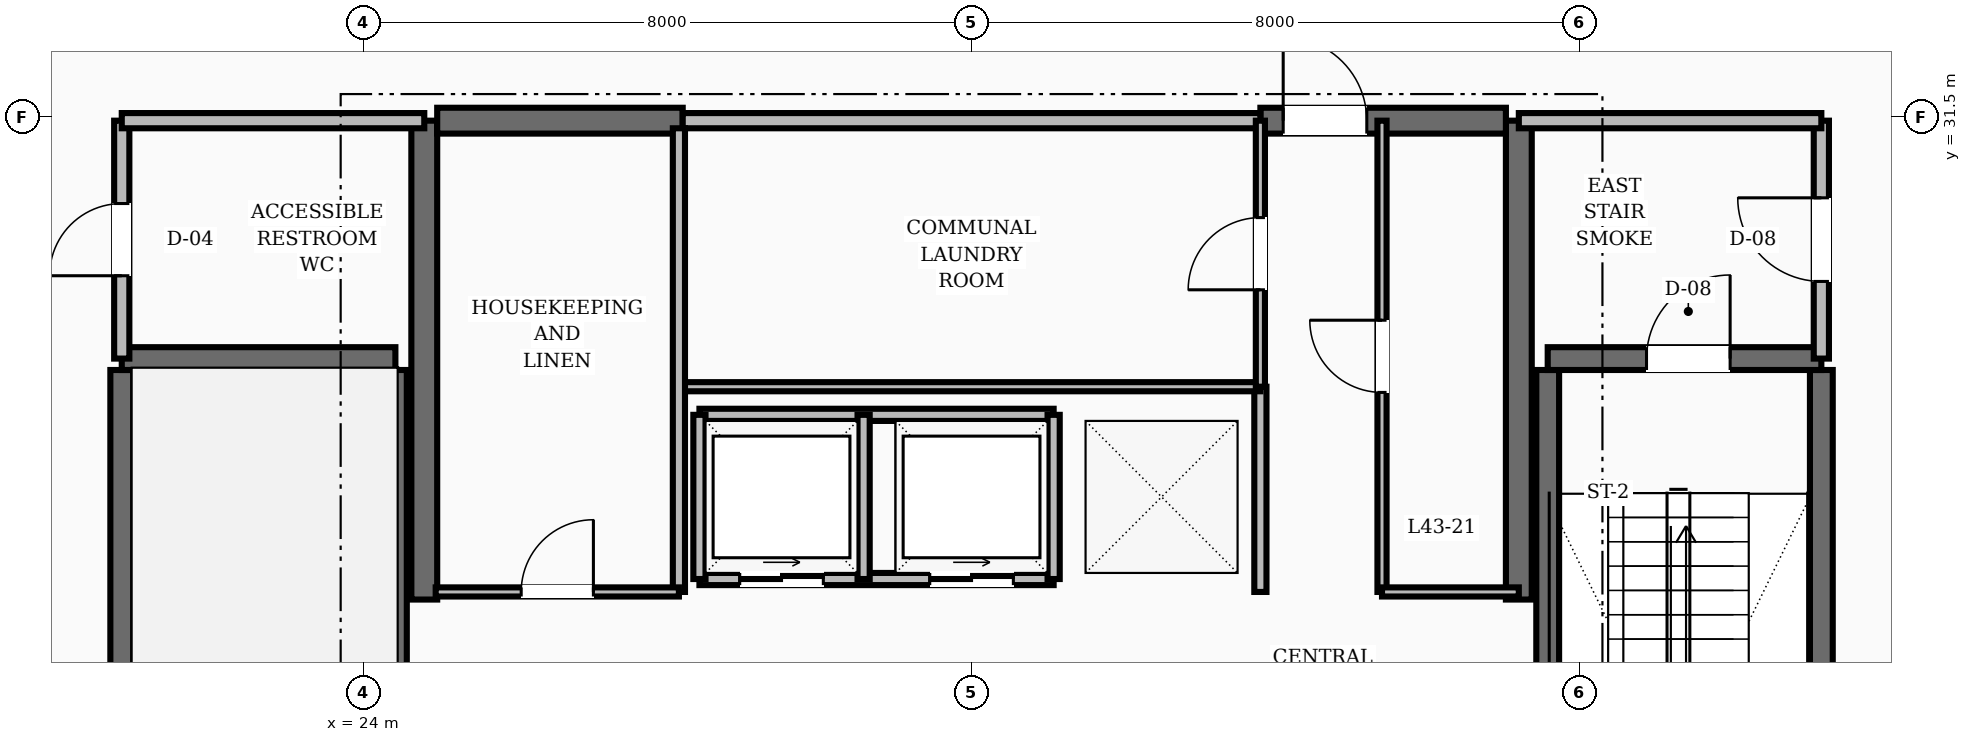
"""IFC4 building model, lengths in metres.
Left out: names, types, materials, properties, quantities, classifications, styles, units other than length and angle.
Written with IfcOpenShell. Run it as: python <this file> out.ifc"""

import sys

from ifc_helpers import new_model, si_unit, direction, frame, frame_2d, origin, place, context, subcontext, project, spatial, rectangle, extrude, element, fill, save


model = new_model("IFC4")
c1 = context("Model", 3, precision=1e-05, world=origin(), true_north=direction((0.0, 1.0)))
c2 = subcontext(c1, "Body", "Model", "MODEL_VIEW")
j1 = project(units=[si_unit("LENGTHUNIT", "METRE"), si_unit("PLANEANGLEUNIT", "RADIAN")], contexts=[c1])
p1 = place(None, origin())
s1 = spatial("IfcSite", under=j1, at=p1, CompositionType="ELEMENT")
p2 = place(p1, origin())
s2 = spatial("IfcBuilding", under=s1, at=p2, CompositionType="ELEMENT")
p3 = place(p2, frame((0.0, 0.0, 167.6)))
s3 = spatial("IfcBuildingStorey", under=s2, at=p3, CompositionType="ELEMENT", Elevation=167.6)
for number, where, z_axis, x_axis in (
    (1, (24.8, 25.15, 0.0), (0.0, 0.0, 1.0), (0.0, 1.0, 0.0)),
    (2, (39.2, 25.15, 0.0), (0.0, 0.0, 1.0), (0.0, 1.0, 0.0)),
):
    element("IfcWall", number, at=place(p3, frame(where, z_axis=z_axis, x_axis=x_axis)), inside=s3, PredefinedType="SHEAR", context=c2, shape_type="SweptSolid", body=[
        extrude(rectangle(XDim=6.3, YDim=0.34, at=frame_2d((3.15, 0.0))), origin(), (0.0, 0.0, 1.0), 3.6),
    ])
p4 = place(p3, frame((24.97, 31.45, 0.0), z_axis=(0.0, 0.0, 1.0), x_axis=(1.0, 0.0, 0.0)))
e3 = element("IfcWall", 3, at=p4, inside=s3, PredefinedType="SHEAR", context=c2, shape_type="SweptSolid", body=[
    extrude(rectangle(XDim=3.23, YDim=0.34, at=frame_2d((1.615, 0.0))), origin(), (0.0, 0.0, 1.0), 3.6),
])
p5 = place(p3, frame((35.8, 31.45, 0.0), z_axis=(0.0, 0.0, 1.0), x_axis=(1.0, 0.0, 0.0)))
e4 = element("IfcWall", 4, at=p5, inside=s3, PredefinedType="SHEAR", context=c2, shape_type="SweptSolid", body=[
    extrude(rectangle(XDim=3.23, YDim=0.34, at=frame_2d((1.615, 0.0))), origin(), (0.0, 0.0, 1.0), 3.6),
])
p6 = place(p5, frame((0.3, 0.0, 0.0)))
e5 = element("IfcOpeningElement", 5, at=p6, cuts=e4, PredefinedType="OPENING", context=c2, shape_type="SweptSolid", body=[
    extrude(rectangle(XDim=1.1, YDim=2.1, at=frame_2d((0.55, 1.05))), frame((0.0, 0.18, 0.0), z_axis=(0.0, -1.0, 0.0), x_axis=(1.0, 0.0, 0.0)), (0.0, 0.0, 1.0), 0.36),
])
for number, where, z_axis, x_axis in (
    (6, (20.82, 19.43, 0.0), (0.0, 0.0, 1.0), (0.0, 1.0, 0.0)),
    (7, (24.42, 19.43, 0.0), (0.0, 0.0, 1.0), (0.0, 1.0, 0.0)),
):
    element("IfcWall", number, at=place(p3, frame(where, z_axis=z_axis, x_axis=x_axis)), inside=s3, PredefinedType="SHEAR", context=c2, shape_type="SweptSolid", body=[
        extrude(rectangle(XDim=8.74, YDim=0.3, at=frame_2d((4.37, 0.0))), origin(), (0.0, 0.0, 1.0), 3.6),
    ])
p7 = place(p3, frame((20.82, 28.32, 0.0), z_axis=(0.0, 0.0, 1.0), x_axis=(1.0, 0.0, 0.0)))
e8 = element("IfcWall", 8, at=p7, inside=s3, PredefinedType="SHEAR", context=c2, shape_type="SweptSolid", body=[
    extrude(rectangle(XDim=3.6, YDim=0.3, at=frame_2d((1.8, 0.0))), origin(), (0.0, 0.0, 1.0), 3.6),
])
for number, where, z_axis, x_axis in (
    (9, (43.18, 19.43, 0.0), (0.0, 0.0, 1.0), (0.0, 1.0, 0.0)),
    (10, (39.58, 19.43, 0.0), (0.0, 0.0, 1.0), (0.0, 1.0, 0.0)),
):
    element("IfcWall", number, at=place(p3, frame(where, z_axis=z_axis, x_axis=x_axis)), inside=s3, PredefinedType="SHEAR", context=c2, shape_type="SweptSolid", body=[
        extrude(rectangle(XDim=8.74, YDim=0.3, at=frame_2d((4.37, 0.0))), origin(), (0.0, 0.0, 1.0), 3.6),
    ])
p8 = place(p3, frame((39.58, 28.32, 0.0), z_axis=(0.0, 0.0, 1.0), x_axis=(1.0, 0.0, 0.0)))
e11 = element("IfcWall", 11, at=p8, inside=s3, PredefinedType="SHEAR", context=c2, shape_type="SweptSolid", body=[
    extrude(rectangle(XDim=3.6, YDim=0.3, at=frame_2d((1.8, 0.0))), origin(), (0.0, 0.0, 1.0), 3.6),
])
p9 = place(p8, frame((1.3, 0.0, 0.0)))
e12 = element("IfcOpeningElement", 12, at=p9, cuts=e11, PredefinedType="OPENING", context=c2, shape_type="SweptSolid", body=[
    extrude(rectangle(XDim=1.1, YDim=2.1, at=frame_2d((0.55, 1.05))), frame((0.0, 0.16, 0.0), z_axis=(0.0, -1.0, 0.0), x_axis=(1.0, 0.0, 0.0)), (0.0, 0.0, 1.0), 0.32),
])
p10 = place(p3, frame((43.18, 28.32, 0.0), z_axis=(0.0, 0.0, 1.0), x_axis=(0.0, 1.0, 0.0)))
e13 = element("IfcWall", 13, at=p10, inside=s3, PredefinedType="SOLIDWALL", context=c2, shape_type="SweptSolid", body=[
    extrude(rectangle(XDim=3.13, YDim=0.2, at=frame_2d((1.565, 0.0))), origin(), (0.0, 0.0, 1.0), 2.8),
])
p11 = place(p10, frame((1.015, 0.0, 0.0)))
e14 = element("IfcOpeningElement", 14, at=p11, cuts=e13, PredefinedType="OPENING", context=c2, shape_type="SweptSolid", body=[
    extrude(rectangle(XDim=1.1, YDim=2.1, at=frame_2d((0.55, 1.05))), frame((0.0, 0.11, 0.0), z_axis=(0.0, -1.0, 0.0), x_axis=(1.0, 0.0, 0.0)), (0.0, 0.0, 1.0), 0.22),
])
p12 = place(p3, frame((39.2, 31.45, 0.0), z_axis=(0.0, 0.0, 1.0), x_axis=(1.0, 0.0, 0.0)))
e15 = element("IfcWall", 15, at=p12, inside=s3, PredefinedType="SOLIDWALL", context=c2, shape_type="SweptSolid", body=[
    extrude(rectangle(XDim=3.98, YDim=0.2, at=frame_2d((1.99, 0.0))), origin(), (0.0, 0.0, 1.0), 2.8),
])
p13 = place(p3, frame((20.82, 28.32, 0.0), z_axis=(0.0, 0.0, 1.0), x_axis=(0.0, 1.0, 0.0)))
e16 = element("IfcWall", 16, at=p13, inside=s3, PredefinedType="SOLIDWALL", context=c2, shape_type="SweptSolid", body=[
    extrude(rectangle(XDim=3.13, YDim=0.2, at=frame_2d((1.565, 0.0))), origin(), (0.0, 0.0, 1.0), 2.8),
])
p14 = place(p13, frame((1.09, 0.0, 0.0)))
e17 = element("IfcOpeningElement", 17, at=p14, cuts=e16, PredefinedType="OPENING", context=c2, shape_type="SweptSolid", body=[
    extrude(rectangle(XDim=0.95, YDim=2.1, at=frame_2d((0.475, 1.05))), frame((0.0, 0.11, 0.0), z_axis=(0.0, -1.0, 0.0), x_axis=(1.0, 0.0, 0.0)), (0.0, 0.0, 1.0), 0.22),
])
p15 = place(p3, frame((20.82, 31.45, 0.0), z_axis=(0.0, 0.0, 1.0), x_axis=(1.0, 0.0, 0.0)))
e18 = element("IfcWall", 18, at=p15, inside=s3, PredefinedType="SOLIDWALL", context=c2, shape_type="SweptSolid", body=[
    extrude(rectangle(XDim=3.98, YDim=0.2, at=frame_2d((1.99, 0.0))), origin(), (0.0, 0.0, 1.0), 2.8),
])
p16 = place(p3, frame((35.8, 25.25, 0.0), z_axis=(0.0, 0.0, 1.0), x_axis=(0.0, 1.0, 0.0)))
e19 = element("IfcWall", 19, at=p16, inside=s3, PredefinedType="SOLIDWALL", context=c2, shape_type="SweptSolid", body=[
    extrude(rectangle(XDim=2.7, YDim=0.16, at=frame_2d((1.35, 0.0))), origin(), (0.0, 0.0, 1.0), 2.8),
])
p17 = place(p3, frame((28.42, 25.42, 0.0), z_axis=(0.0, 0.0, 1.0), x_axis=(1.0, 0.0, 0.0)))
e20 = element("IfcWall", 20, at=p17, inside=s3, PredefinedType="SOLIDWALL", context=c2, shape_type="SweptSolid", body=[
    extrude(rectangle(XDim=4.66, YDim=0.16, at=frame_2d((2.33, 0.0))), origin(), (0.0, 0.0, 1.0), 2.8),
])
p18 = place(p17, frame((0.53, 0.0, 0.0)))
e21 = element("IfcOpeningElement", 21, at=p18, cuts=e20, PredefinedType="OPENING", context=c2, shape_type="SweptSolid", body=[
    extrude(rectangle(XDim=1.1, YDim=2.15, at=frame_2d((0.55, 1.075))), frame((0.0, 0.09, 0.0), z_axis=(0.0, -1.0, 0.0), x_axis=(1.0, 0.0, 0.0)), (0.0, 0.0, 1.0), 0.18),
])
p19 = place(p17, frame((3.03, 0.0, 0.0)))
e22 = element("IfcOpeningElement", 22, at=p19, cuts=e20, PredefinedType="OPENING", context=c2, shape_type="SweptSolid", body=[
    extrude(rectangle(XDim=1.1, YDim=2.15, at=frame_2d((0.55, 1.075))), frame((0.0, 0.09, 0.0), z_axis=(0.0, -1.0, 0.0), x_axis=(1.0, 0.0, 0.0)), (0.0, 0.0, 1.0), 0.18),
])
p20 = place(p3, frame((28.42, 27.58, 0.0), z_axis=(0.0, 0.0, 1.0), x_axis=(1.0, 0.0, 0.0)))
e23 = element("IfcWall", 23, at=p20, inside=s3, PredefinedType="SOLIDWALL", context=c2, shape_type="SweptSolid", body=[
    extrude(rectangle(XDim=4.66, YDim=0.16, at=frame_2d((2.33, 0.0))), origin(), (0.0, 0.0, 1.0), 2.8),
])
for number, where, z_axis, x_axis in (
    (24, (28.42, 25.42, 0.0), (0.0, 0.0, 1.0), (0.0, 1.0, 0.0)),
    (25, (30.58, 25.42, 0.0), (0.0, 0.0, 1.0), (0.0, 1.0, 0.0)),
    (26, (33.08, 25.42, 0.0), (0.0, 0.0, 1.0), (0.0, 1.0, 0.0)),
):
    element("IfcWall", number, at=place(p3, frame(where, z_axis=z_axis, x_axis=x_axis)), inside=s3, PredefinedType="SOLIDWALL", context=c2, shape_type="SweptSolid", body=[
        extrude(rectangle(XDim=2.16, YDim=0.16, at=frame_2d((1.08, 0.0))), origin(), (0.0, 0.0, 1.0), 2.8),
    ])
p21 = place(p3, frame((28.2, 31.45, 0.0), z_axis=(0.0, 0.0, 1.0), x_axis=(1.0, 0.0, 0.0)))
e27 = element("IfcWall", 27, at=p21, inside=s3, PredefinedType="SOLIDWALL", context=c2, shape_type="SweptSolid", body=[
    extrude(rectangle(XDim=7.6, YDim=0.2, at=frame_2d((3.8, 0.0))), origin(), (0.0, 0.0, 1.0), 2.8),
])
p22 = place(p3, frame((28.2, 27.95, 0.0), z_axis=(0.0, 0.0, 1.0), x_axis=(1.0, 0.0, 0.0)))
e28 = element("IfcWall", 28, at=p22, inside=s3, PredefinedType="PARTITIONING", context=c2, shape_type="SweptSolid", body=[
    extrude(rectangle(XDim=7.6, YDim=0.12, at=frame_2d((3.8, 0.0))), origin(), (0.0, 0.0, 1.0), 2.8),
])
p23 = place(p3, frame((35.8, 27.95, 0.0), z_axis=(0.0, 0.0, 1.0), x_axis=(0.0, 1.0, 0.0)))
e29 = element("IfcWall", 29, at=p23, inside=s3, PredefinedType="PARTITIONING", context=c2, shape_type="SweptSolid", body=[
    extrude(rectangle(XDim=3.5, YDim=0.12, at=frame_2d((1.75, 0.0))), origin(), (0.0, 0.0, 1.0), 2.8),
])
p24 = place(p23, frame((1.275, 0.0, 0.0)))
e30 = element("IfcOpeningElement", 30, at=p24, cuts=e29, PredefinedType="OPENING", context=c2, shape_type="SweptSolid", body=[
    extrude(rectangle(XDim=0.95, YDim=2.1, at=frame_2d((0.475, 1.05))), frame((0.0, 0.07, 0.0), z_axis=(0.0, -1.0, 0.0), x_axis=(1.0, 0.0, 0.0)), (0.0, 0.0, 1.0), 0.14),
])
p25 = place(p3, frame((28.15, 25.25, 0.0), z_axis=(0.0, 0.0, 1.0), x_axis=(0.0, 1.0, 0.0)))
e31 = element("IfcWall", 31, at=p25, inside=s3, PredefinedType="SOLIDWALL", context=c2, shape_type="SweptSolid", body=[
    extrude(rectangle(XDim=6.1, YDim=0.16, at=frame_2d((3.05, 0.0))), origin(), (0.0, 0.0, 1.0), 2.8),
])
p26 = place(p3, frame((24.95, 25.25, 0.0), z_axis=(0.0, 0.0, 1.0), x_axis=(1.0, 0.0, 0.0)))
e32 = element("IfcWall", 32, at=p26, inside=s3, PredefinedType="PARTITIONING", context=c2, shape_type="SweptSolid", body=[
    extrude(rectangle(XDim=3.2, YDim=0.12, at=frame_2d((1.6, 0.0))), origin(), (0.0, 0.0, 1.0), 2.8),
])
p27 = place(p26, frame((1.125, 0.0, 0.0)))
e33 = element("IfcOpeningElement", 33, at=p27, cuts=e32, PredefinedType="OPENING", context=c2, shape_type="SweptSolid", body=[
    extrude(rectangle(XDim=0.95, YDim=2.1, at=frame_2d((0.475, 1.05))), frame((0.0, 0.07, 0.0), z_axis=(0.0, -1.0, 0.0), x_axis=(1.0, 0.0, 0.0)), (0.0, 0.0, 1.0), 0.14),
])
p28 = place(p3, frame((37.4, 25.25, 0.0), z_axis=(0.0, 0.0, 1.0), x_axis=(0.0, 1.0, 0.0)))
e34 = element("IfcWall", 34, at=p28, inside=s3, PredefinedType="PARTITIONING", context=c2, shape_type="SweptSolid", body=[
    extrude(rectangle(XDim=6.2, YDim=0.12, at=frame_2d((3.1, 0.0))), origin(), (0.0, 0.0, 1.0), 2.8),
])
p29 = place(p28, frame((2.625, 0.0, 0.0)))
e35 = element("IfcOpeningElement", 35, at=p29, cuts=e34, PredefinedType="OPENING", context=c2, shape_type="SweptSolid", body=[
    extrude(rectangle(XDim=0.95, YDim=2.1, at=frame_2d((0.475, 1.05))), frame((0.0, 0.07, 0.0), z_axis=(0.0, -1.0, 0.0), x_axis=(1.0, 0.0, 0.0)), (0.0, 0.0, 1.0), 0.14),
])
p30 = place(p3, frame((37.4, 25.25, 0.0), z_axis=(0.0, 0.0, 1.0), x_axis=(1.0, 0.0, 0.0)))
e36 = element("IfcWall", 36, at=p30, inside=s3, PredefinedType="PARTITIONING", context=c2, shape_type="SweptSolid", body=[
    extrude(rectangle(XDim=1.8, YDim=0.12, at=frame_2d((0.9, 0.0))), origin(), (0.0, 0.0, 1.0), 2.8),
])
p31 = place(p9, origin())
e37 = element("IfcDoor", 37, at=p31, inside=s3, OperationType="SINGLE_SWING_RIGHT", PredefinedType="DOOR", context=c2, shape_type="SweptSolid", body=[
    extrude(rectangle(XDim=1.1, YDim=2.1, at=frame_2d((0.55, 1.05))), frame((0.0, 0.025, 0.0), z_axis=(0.0, -1.0, 0.0), x_axis=(1.0, 0.0, 0.0)), (0.0, 0.0, 1.0), 0.05),
])
fill(e12, e37)
p32 = place(p11, origin())
e38 = element("IfcDoor", 38, at=p32, inside=s3, OperationType="SINGLE_SWING_RIGHT", PredefinedType="DOOR", context=c2, shape_type="SweptSolid", body=[
    extrude(rectangle(XDim=1.1, YDim=2.1, at=frame_2d((0.55, 1.05))), frame((0.0, 0.025, 0.0), z_axis=(0.0, -1.0, 0.0), x_axis=(1.0, 0.0, 0.0)), (0.0, 0.0, 1.0), 0.05),
])
fill(e14, e38)
p33 = place(p14, origin())
e39 = element("IfcDoor", 39, at=p33, inside=s3, OperationType="SINGLE_SWING_LEFT", PredefinedType="DOOR", context=c2, shape_type="SweptSolid", body=[
    extrude(rectangle(XDim=0.95, YDim=2.1, at=frame_2d((0.475, 1.05))), frame((0.0, 0.025, 0.0), z_axis=(0.0, -1.0, 0.0), x_axis=(1.0, 0.0, 0.0)), (0.0, 0.0, 1.0), 0.05),
])
fill(e17, e39)
p34 = place(p6, origin())
e40 = element("IfcDoor", 40, at=p34, inside=s3, OperationType="SINGLE_SWING_LEFT", PredefinedType="DOOR", context=c2, shape_type="SweptSolid", body=[
    extrude(rectangle(XDim=1.1, YDim=2.1, at=frame_2d((0.55, 1.05))), frame((0.0, 0.025, 0.0), z_axis=(0.0, -1.0, 0.0), x_axis=(1.0, 0.0, 0.0)), (0.0, 0.0, 1.0), 0.05),
])
fill(e5, e40)
p35 = place(p18, origin())
e41 = element("IfcDoor", 41, at=p35, inside=s3, OperationType="SLIDING_TO_RIGHT", PredefinedType="DOOR", context=c2, shape_type="SweptSolid", body=[
    extrude(rectangle(XDim=1.1, YDim=2.15, at=frame_2d((0.55, 1.075))), frame((0.0, 0.025, 0.0), z_axis=(0.0, -1.0, 0.0), x_axis=(1.0, 0.0, 0.0)), (0.0, 0.0, 1.0), 0.05),
])
fill(e21, e41)
p36 = place(p19, origin())
e42 = element("IfcDoor", 42, at=p36, inside=s3, OperationType="SLIDING_TO_RIGHT", PredefinedType="DOOR", context=c2, shape_type="SweptSolid", body=[
    extrude(rectangle(XDim=1.1, YDim=2.15, at=frame_2d((0.55, 1.075))), frame((0.0, 0.025, 0.0), z_axis=(0.0, -1.0, 0.0), x_axis=(1.0, 0.0, 0.0)), (0.0, 0.0, 1.0), 0.05),
])
fill(e22, e42)
p37 = place(p24, origin())
e43 = element("IfcDoor", 43, at=p37, inside=s3, OperationType="SINGLE_SWING_LEFT", PredefinedType="DOOR", context=c2, shape_type="SweptSolid", body=[
    extrude(rectangle(XDim=0.95, YDim=2.1, at=frame_2d((0.475, 1.05))), frame((0.0, 0.025, 0.0), z_axis=(0.0, -1.0, 0.0), x_axis=(1.0, 0.0, 0.0)), (0.0, 0.0, 1.0), 0.05),
])
fill(e30, e43)
p38 = place(p27, origin())
e44 = element("IfcDoor", 44, at=p38, inside=s3, OperationType="SINGLE_SWING_RIGHT", PredefinedType="DOOR", context=c2, shape_type="SweptSolid", body=[
    extrude(rectangle(XDim=0.95, YDim=2.1, at=frame_2d((0.475, 1.05))), frame((0.0, 0.025, 0.0), z_axis=(0.0, -1.0, 0.0), x_axis=(1.0, 0.0, 0.0)), (0.0, 0.0, 1.0), 0.05),
])
fill(e33, e44)
p39 = place(p29, origin())
e45 = element("IfcDoor", 45, at=p39, inside=s3, OperationType="SINGLE_SWING_RIGHT", PredefinedType="DOOR", context=c2, shape_type="SweptSolid", body=[
    extrude(rectangle(XDim=0.95, YDim=2.1, at=frame_2d((0.475, 1.05))), frame((0.0, 0.025, 0.0), z_axis=(0.0, -1.0, 0.0), x_axis=(1.0, 0.0, 0.0)), (0.0, 0.0, 1.0), 0.05),
])
fill(e35, e45)
save(model, sys.argv[1])
